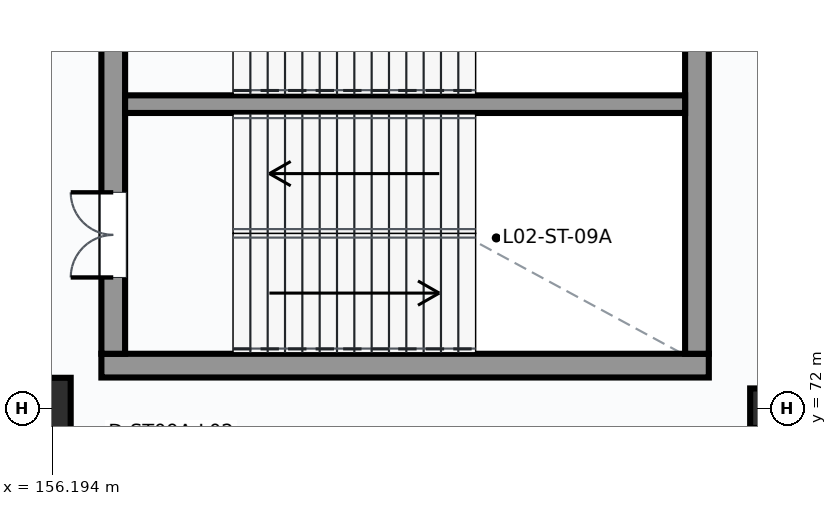
"""IFC4 building model, lengths in metres.
Left out: names, types, materials, properties, quantities, classifications, styles, units other than length and angle.
Written with IfcOpenShell. Run it as: python <this file> out.ifc"""

import sys

from ifc_helpers import new_model, si_unit, direction, frame, frame_2d, origin, origin_2d, place, context, subcontext, project, spatial, rectangle, extrude, element, fill, save


model = new_model("IFC4")
c1 = context("Model", 3, precision=1e-05, world=origin(), true_north=direction((0.0, 1.0)))
c2 = subcontext(c1, "Body", "Model", "MODEL_VIEW")
j1 = project(units=[si_unit("LENGTHUNIT", "METRE"), si_unit("PLANEANGLEUNIT", "RADIAN")], contexts=[c1])
p1 = place(None, origin())
s1 = spatial("IfcSite", under=j1, at=p1, CompositionType="ELEMENT")
p2 = place(p1, origin())
s2 = spatial("IfcBuilding", under=s1, at=p2, CompositionType="ELEMENT")
p3 = place(p2, frame((0.0, 0.0, 10.2)))
s3 = spatial("IfcBuildingStorey", under=s2, at=p3, CompositionType="ELEMENT", Elevation=10.2)
p4 = place(p3, frame((156.0, 72.0, 0.0), z_axis=(0.0, 0.0, 1.0), x_axis=(1.0, 0.0, 0.0)))
e1 = element("IfcColumn", 1, at=p4, inside=s3, PredefinedType="COLUMN", context=c2, shape_type="SweptSolid", body=[
    extrude(rectangle(XDim=1.0, YDim=1.0, at=origin_2d()), origin(), (0.0, 0.0, 1.0), 4.5),
])
p5 = place(p3, frame((168.0, 72.0, 0.0), z_axis=(0.0, 0.0, 1.0), x_axis=(1.0, 0.0, 0.0)))
e2 = element("IfcColumn", 2, at=p5, inside=s3, PredefinedType="COLUMN", context=c2, shape_type="SweptSolid", body=[
    extrude(rectangle(XDim=0.65, YDim=0.65, at=origin_2d()), origin(), (0.0, 0.0, 1.0), 4.5),
])
p6 = place(p3, frame((157.005, 72.7, 0.0), z_axis=(0.0, 0.0, 1.0), x_axis=(1.0, 0.0, 0.0)))
e3 = element("IfcWall", 3, at=p6, inside=s3, PredefinedType="SHEAR", context=c2, shape_type="SweptSolid", body=[
    extrude(rectangle(XDim=9.99, YDim=0.39, at=frame_2d((4.995, 0.0))), origin(), (0.0, 0.0, 1.0), 4.5),
])
p7 = place(p3, frame((157.2, 72.895, 0.0), z_axis=(0.0, 0.0, 1.0), x_axis=(0.0, 1.0, 0.0)))
e4 = element("IfcWall", 4, at=p7, inside=s3, PredefinedType="SHEAR", context=c2, shape_type="SweptSolid", body=[
    extrude(rectangle(XDim=8.21, YDim=0.39, at=frame_2d((4.105, 0.0))), origin(), (0.0, 0.0, 1.0), 4.5),
])
p8 = place(p7, frame((1.255, 0.0, 0.0)))
e5 = element("IfcOpeningElement", 5, at=p8, cuts=e4, PredefinedType="OPENING", context=c2, shape_type="SweptSolid", body=[
    extrude(rectangle(XDim=1.4, YDim=2.2, at=frame_2d((0.7, 1.1))), frame((0.0, 0.205, 0.0), z_axis=(0.0, -1.0, 0.0), x_axis=(1.0, 0.0, 0.0)), (0.0, 0.0, 1.0), 0.41),
])
p9 = place(p7, frame((5.595, 0.0, 0.0)))
e6 = element("IfcOpeningElement", 6, at=p9, cuts=e4, PredefinedType="OPENING", context=c2, shape_type="SweptSolid", body=[
    extrude(rectangle(XDim=1.32, YDim=2.2, at=frame_2d((0.66, 1.1))), frame((0.0, 0.205, 0.0), z_axis=(0.0, -1.0, 0.0), x_axis=(1.0, 0.0, 0.0)), (0.0, 0.0, 1.0), 0.41),
])
p10 = place(p3, frame((166.8, 72.895, 0.0), z_axis=(0.0, 0.0, 1.0), x_axis=(0.0, 1.0, 0.0)))
e7 = element("IfcWall", 7, at=p10, inside=s3, PredefinedType="SHEAR", context=c2, shape_type="SweptSolid", body=[
    extrude(rectangle(XDim=8.21, YDim=0.39, at=frame_2d((4.105, 0.0))), origin(), (0.0, 0.0, 1.0), 4.5),
])
p11 = place(p3, frame((157.395, 77.0, 0.0), z_axis=(0.0, 0.0, 1.0), x_axis=(1.0, 0.0, 0.0)))
e8 = element("IfcWall", 8, at=p11, inside=s3, PredefinedType="SHEAR", context=c2, shape_type="SweptSolid", body=[
    extrude(rectangle(XDim=9.21, YDim=0.29, at=frame_2d((4.605, 0.0))), origin(), (0.0, 0.0, 1.0), 4.5),
])
p12 = place(p8, origin())
e9 = element("IfcDoor", 9, at=p12, inside=s3, OperationType="DOUBLE_DOOR_SINGLE_SWING", PredefinedType="DOOR", context=c2, shape_type="SweptSolid", body=[
    extrude(rectangle(XDim=1.4, YDim=2.2, at=frame_2d((0.7, 1.1))), frame((0.0, 0.025, 0.0), z_axis=(0.0, -1.0, 0.0), x_axis=(1.0, 0.0, 0.0)), (0.0, 0.0, 1.0), 0.05),
])
fill(e5, e9)
save(model, sys.argv[1])
